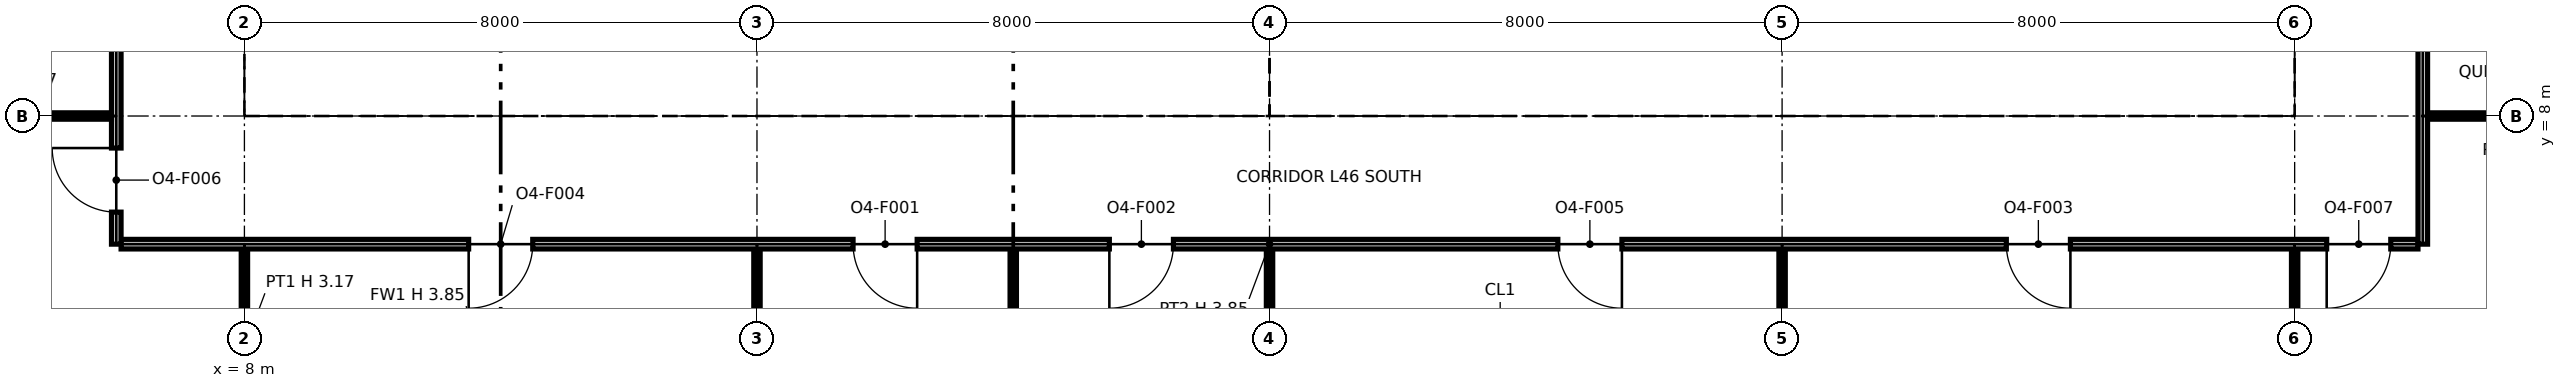
"""IFC4 building model, lengths in metres.
Left out: names, types, materials, properties, quantities, classifications, styles, units other than length and angle.
Written with IfcOpenShell. Run it as: python <this file> out.ifc"""

import sys

from ifc_helpers import new_model, si_unit, direction, frame, frame_2d, origin, origin_2d, place, context, subcontext, project, spatial, polyline, rectangle, i_section, outline, extrude, element, fill, save


model = new_model("IFC4")
c1 = context("Model", 3, precision=1e-05, world=origin(), true_north=direction((0.0, 1.0)))
c2 = subcontext(c1, "Body", "Model", "MODEL_VIEW")
j1 = project(units=[si_unit("LENGTHUNIT", "METRE"), si_unit("PLANEANGLEUNIT", "RADIAN")], contexts=[c1])
p1 = place(None, origin())
s1 = spatial("IfcSite", under=j1, at=p1, CompositionType="ELEMENT")
p2 = place(p1, origin())
s2 = spatial("IfcBuilding", under=s1, at=p2, CompositionType="ELEMENT")
p3 = place(p2, frame((0.0, 0.0, 217.0)))
s3 = spatial("IfcBuildingStorey", under=s2, at=p3, CompositionType="ELEMENT", Elevation=217.0)
for number, where, z_axis, x_axis in (
    (1, (8.0, 8.0, 0.0), (0.0, 0.0, 1.0), (1.0, 0.0, 0.0)),
    (2, (16.0, 8.0, 0.0), (0.0, 0.0, 1.0), (1.0, 0.0, 0.0)),
):
    element("IfcColumn", number, at=place(p3, frame(where, z_axis=z_axis, x_axis=x_axis)), inside=s3, PredefinedType="COLUMN", context=c2, shape_type="SweptSolid", body=[
        extrude(i_section(OverallWidth=0.373, OverallDepth=0.368, WebThickness=0.015, FlangeThickness=0.024, at=origin_2d()), origin(), (0.0, 0.0, 1.0), 3.85),
    ])
p4 = place(p3, frame((24.0, 8.0, 0.0), z_axis=(0.0, 0.0, 1.0), x_axis=(1.0, 0.0, 0.0)))
e3 = element("IfcColumn", 3, at=p4, inside=s3, PredefinedType="COLUMN", context=c2, shape_type="SweptSolid", body=[
    extrude(i_section(OverallWidth=0.394, OverallDepth=0.376, WebThickness=0.017, FlangeThickness=0.028, at=origin_2d()), origin(), (0.0, 0.0, 1.0), 3.85),
])
for number, where, z_axis, x_axis in (
    (4, (32.0, 8.0, 0.0), (0.0, 0.0, 1.0), (1.0, 0.0, 0.0)),
    (5, (40.0, 8.0, 0.0), (0.0, 0.0, 1.0), (1.0, 0.0, 0.0)),
):
    element("IfcColumn", number, at=place(p3, frame(where, z_axis=z_axis, x_axis=x_axis)), inside=s3, PredefinedType="COLUMN", context=c2, shape_type="SweptSolid", body=[
        extrude(i_section(OverallWidth=0.373, OverallDepth=0.368, WebThickness=0.015, FlangeThickness=0.024, at=origin_2d()), origin(), (0.0, 0.0, 1.0), 3.85),
    ])
p5 = place(p3, frame((8.65, 8.75, 0.0), z_axis=(0.0, 0.0, 1.0), x_axis=(1.0, 0.0, 0.0)))
e6 = element("IfcWall", 6, at=p5, inside=s3, PredefinedType="PARTITIONING", context=c2, shape_type="SweptSolid", body=[
    extrude(outline(polyline([(0.0, 0.0), (14.7, 0.0), (14.7, 3.85), (7.438, 3.85), (7.438, 3.308), (7.262, 3.308), (7.261, 3.85), (0.0, 3.85), (0.0, 0.0)])), frame((0.0, 0.1, 0.0), z_axis=(0.0, -1.0, 0.0), x_axis=(1.0, 0.0, 0.0)), (0.0, 0.0, 1.0), 0.2),
])
p6 = place(p5, frame((1.3, 0.0, 0.0)))
e7 = element("IfcOpeningElement", 7, at=p6, cuts=e6, PredefinedType="OPENING", context=c2, shape_type="SweptSolid", body=[
    extrude(rectangle(XDim=1.4, YDim=2.1, at=frame_2d((0.7, 1.05))), frame((0.0, 0.11, 0.0), z_axis=(0.0, -1.0, 0.0), x_axis=(1.0, 0.0, 0.0)), (0.0, 0.0, 1.0), 0.22),
])
p7 = place(p5, frame((4.6, 0.0, 0.0)))
e8 = element("IfcOpeningElement", 8, at=p7, cuts=e6, PredefinedType="OPENING", context=c2, shape_type="SweptSolid", body=[
    extrude(rectangle(XDim=1.4, YDim=2.1, at=frame_2d((0.7, 1.05))), frame((0.0, 0.11, 0.0), z_axis=(0.0, -1.0, 0.0), x_axis=(1.0, 0.0, 0.0)), (0.0, 0.0, 1.0), 0.22),
])
p8 = place(p5, frame((10.4, 0.0, 0.0)))
e9 = element("IfcOpeningElement", 9, at=p8, cuts=e6, PredefinedType="OPENING", context=c2, shape_type="SweptSolid", body=[
    extrude(rectangle(XDim=1.2, YDim=2.1, at=frame_2d((0.6, 1.05))), frame((0.0, 0.11, 0.0), z_axis=(0.0, -1.0, 0.0), x_axis=(1.0, 0.0, 0.0)), (0.0, 0.0, 1.0), 0.22),
])
p9 = place(p3, frame((8.75, 8.85, 0.0), z_axis=(0.0, 0.0, 1.0), x_axis=(0.0, 1.0, 0.0)))
e10 = element("IfcWall", 10, at=p9, inside=s3, PredefinedType="PARTITIONING", context=c2, shape_type="SweptSolid", body=[
    extrude(outline(polyline([(0.0, 0.0), (14.3, 0.0), (14.3, 3.85), (10.225, 3.85), (10.224, 3.44), (10.076, 3.44), (10.075, 3.85), (7.239, 3.85), (7.238, 3.308), (7.062, 3.308), (7.062, 3.85), (0.0, 3.85), (0.0, 0.0)])), frame((0.0, 0.1, 0.0), z_axis=(0.0, -1.0, 0.0), x_axis=(1.0, 0.0, 0.0)), (0.0, 0.0, 1.0), 0.2),
])
p10 = place(p9, frame((8.3, 0.0, 0.0)))
e11 = element("IfcOpeningElement", 11, at=p10, cuts=e10, PredefinedType="OPENING", context=c2, shape_type="SweptSolid", body=[
    extrude(rectangle(XDim=1.8, YDim=2.1, at=frame_2d((0.9, 1.05))), frame((0.0, 0.11, 0.0), z_axis=(0.0, -1.0, 0.0), x_axis=(1.0, 0.0, 0.0)), (0.0, 0.0, 1.0), 0.22),
])
p11 = place(p3, frame((12.4, 8.85, 0.0), z_axis=(0.0, 0.0, 1.0), x_axis=(0.0, 1.0, 0.0)))
e12 = element("IfcWall", 12, at=p11, inside=s3, PredefinedType="PARTITIONING", context=c2, shape_type="SweptSolid", body=[
    extrude(rectangle(XDim=6.85, YDim=0.2, at=frame_2d((3.425, 0.0))), origin(), (0.0, 0.0, 1.0), 3.85),
])
p12 = place(p3, frame((15.85, 8.85, 0.0), z_axis=(0.0, 0.0, 1.0), x_axis=(0.0, 1.0, 0.0)))
e13 = element("IfcWall", 13, at=p12, inside=s3, PredefinedType="PARTITIONING", context=c2, shape_type="SweptSolid", body=[
    extrude(rectangle(XDim=1.55, YDim=0.9, at=frame_2d((0.775, 0.0))), origin(), (0.0, 0.0, 1.0), 3.308),
])
p13 = place(p12, frame((0.3, 0.0, 0.0)))
e14 = element("IfcOpeningElement", 14, at=p13, cuts=e13, PredefinedType="OPENING", context=c2, shape_type="SweptSolid", body=[
    extrude(rectangle(XDim=1.1, YDim=2.1, at=frame_2d((0.55, 1.05))), frame((0.0, 0.46, 0.0), z_axis=(0.0, -1.0, 0.0), x_axis=(1.0, 0.0, 0.0)), (0.0, 0.0, 1.0), 0.92),
])
p14 = place(p3, frame((23.25, 8.85, 0.0), z_axis=(0.0, 0.0, 1.0), x_axis=(0.0, 1.0, 0.0)))
e15 = element("IfcWall", 15, at=p14, inside=s3, PredefinedType="PARTITIONING", context=c2, shape_type="SweptSolid", body=[
    extrude(outline(polyline([(0.0, 0.0), (14.3, 0.0), (14.3, 3.85), (10.225, 3.85), (10.224, 3.44), (10.076, 3.44), (10.075, 3.85), (7.239, 3.85), (7.238, 3.308), (7.062, 3.308), (7.062, 3.85), (5.225, 3.85), (5.224, 3.44), (5.076, 3.44), (5.075, 3.85), (0.0, 3.85), (0.0, 0.0)])), frame((0.0, 0.1, 0.0), z_axis=(0.0, -1.0, 0.0), x_axis=(1.0, 0.0, 0.0)), (0.0, 0.0, 1.0), 0.2),
])
p15 = place(p14, frame((8.3, 0.0, 0.0)))
e16 = element("IfcOpeningElement", 16, at=p15, cuts=e15, PredefinedType="OPENING", context=c2, shape_type="SweptSolid", body=[
    extrude(rectangle(XDim=1.8, YDim=2.1, at=frame_2d((0.9, 1.05))), frame((0.0, 0.11, 0.0), z_axis=(0.0, -1.0, 0.0), x_axis=(1.0, 0.0, 0.0)), (0.0, 0.0, 1.0), 0.22),
])
p16 = place(p3, frame((24.65, 8.75, 0.0), z_axis=(0.0, 0.0, 1.0), x_axis=(1.0, 0.0, 0.0)))
e17 = element("IfcWall", 17, at=p16, inside=s3, PredefinedType="PARTITIONING", context=c2, shape_type="SweptSolid", body=[
    extrude(outline(polyline([(0.0, 0.0), (14.7, 0.0), (14.7, 3.85), (7.438, 3.85), (7.438, 3.308), (7.262, 3.308), (7.261, 3.85), (0.0, 3.85), (0.0, 0.0)])), frame((0.0, 0.1, 0.0), z_axis=(0.0, -1.0, 0.0), x_axis=(1.0, 0.0, 0.0)), (0.0, 0.0, 1.0), 0.2),
])
p17 = place(p3, frame((24.75, 8.85, 0.0), z_axis=(0.0, 0.0, 1.0), x_axis=(0.0, 1.0, 0.0)))
e18 = element("IfcWall", 18, at=p17, inside=s3, PredefinedType="PARTITIONING", context=c2, shape_type="SweptSolid", body=[
    extrude(outline(polyline([(0.0, 0.0), (6.3, 0.0), (6.3, 3.85), (3.225, 3.85), (3.224, 3.44), (3.076, 3.44), (3.075, 3.85), (0.0, 3.85), (0.0, 0.0)])), frame((0.0, 0.1, 0.0), z_axis=(0.0, -1.0, 0.0), x_axis=(1.0, 0.0, 0.0)), (0.0, 0.0, 1.0), 0.2),
])
for number, where, z_axis, x_axis in (
    (19, (27.2, 8.85, 0.0), (0.0, 0.0, 1.0), (0.0, 1.0, 0.0)),
    (20, (29.5, 8.85, 0.0), (0.0, 0.0, 1.0), (0.0, 1.0, 0.0)),
):
    element("IfcWall", number, at=place(p3, frame(where, z_axis=z_axis, x_axis=x_axis)), inside=s3, PredefinedType="PARTITIONING", context=c2, shape_type="SweptSolid", body=[
        extrude(rectangle(XDim=2.55, YDim=0.2, at=frame_2d((1.275, 0.0))), origin(), (0.0, 0.0, 1.0), 3.85),
    ])
p18 = place(p3, frame((32.0, 8.85, 0.0), z_axis=(0.0, 0.0, 1.0), x_axis=(0.0, 1.0, 0.0)))
e21 = element("IfcWall", 21, at=p18, inside=s3, PredefinedType="PARTITIONING", context=c2, shape_type="SweptSolid", body=[
    extrude(rectangle(XDim=2.55, YDim=0.6, at=frame_2d((1.275, 0.0))), origin(), (0.0, 0.0, 1.0), 3.308),
])
for number, where, z_axis, x_axis in (
    (22, (35.6, 8.85, 0.0), (0.0, 0.0, 1.0), (0.0, 1.0, 0.0)),
    (23, (39.25, 8.85, 0.0), (0.0, 0.0, 1.0), (0.0, 1.0, 0.0)),
):
    element("IfcWall", number, at=place(p3, frame(where, z_axis=z_axis, x_axis=x_axis)), inside=s3, PredefinedType="PARTITIONING", context=c2, shape_type="SweptSolid", body=[
        extrude(rectangle(XDim=6.3, YDim=0.2, at=frame_2d((3.15, 0.0))), origin(), (0.0, 0.0, 1.0), 3.85),
    ])
p19 = place(p3, frame((20.0, 0.13, 0.0), z_axis=(0.0, 0.0, 1.0), x_axis=(0.0, 1.0, 0.0)))
e24 = element("IfcWall", 24, at=p19, inside=s3, PredefinedType="PARTITIONING", context=c2, shape_type="SweptSolid", body=[
    extrude(outline(polyline([(0.0, 0.0), (5.795, 0.0), (5.795, 3.85), (4.17, 3.85), (4.168, 3.172), (3.572, 3.172), (3.57, 3.85), (0.0, 3.85), (0.0, 0.0)])), frame((0.0, 0.05, 0.0), z_axis=(0.0, -1.0, 0.0), x_axis=(1.0, 0.0, 0.0)), (0.0, 0.0, 1.0), 0.1),
])
p20 = place(p3, frame((40.0, 0.13, 0.0), z_axis=(0.0, 0.0, 1.0), x_axis=(0.0, 1.0, 0.0)))
e25 = element("IfcWall", 25, at=p20, inside=s3, PredefinedType="PARTITIONING", context=c2, shape_type="SweptSolid", body=[
    extrude(rectangle(XDim=5.795, YDim=0.1, at=frame_2d((2.897, 0.0))), origin(), (0.0, 0.0, 1.0), 3.172),
])
for number, where, z_axis, x_axis in (
    (26, (8.0, 2.83, 0.0), (0.0, 0.0, 1.0), (0.0, 1.0, 0.0)),
    (27, (16.0, 2.83, 0.0), (0.0, 0.0, 1.0), (0.0, 1.0, 0.0)),
    (28, (24.0, 2.83, 0.0), (0.0, 0.0, 1.0), (0.0, 1.0, 0.0)),
    (29, (32.0, 2.83, 0.0), (0.0, 0.0, 1.0), (0.0, 1.0, 0.0)),
):
    element("IfcWall", number, at=place(p3, frame(where, z_axis=z_axis, x_axis=x_axis)), inside=s3, PredefinedType="PARTITIONING", context=c2, shape_type="SweptSolid", body=[
        extrude(rectangle(XDim=3.095, YDim=0.1, at=frame_2d((1.547, 0.0))), origin(), (0.0, 0.0, 1.0), 3.172),
    ])
p21 = place(p3, frame((6.075, 6.0, 0.0), z_axis=(0.0, 0.0, 1.0), x_axis=(1.0, 0.0, 0.0)))
e30 = element("IfcWall", 30, at=p21, inside=s3, PredefinedType="PARTITIONING", context=c2, shape_type="SweptSolid", body=[
    extrude(rectangle(XDim=35.85, YDim=0.15, at=frame_2d((17.925, 0.0))), origin(), (0.0, 0.0, 1.0), 3.85),
])
p22 = place(p21, frame((12.425, 0.0, 0.0), z_axis=(0.0, 0.0, 1.0), x_axis=(-1.0, 0.0, 0.0)))
e31 = element("IfcOpeningElement", 31, at=p22, cuts=e30, PredefinedType="OPENING", context=c2, shape_type="SweptSolid", body=[
    extrude(rectangle(XDim=1.0, YDim=2.1, at=frame_2d((0.5, 1.05))), frame((0.0, 0.085, 0.0), z_axis=(0.0, -1.0, 0.0), x_axis=(1.0, 0.0, 0.0)), (0.0, 0.0, 1.0), 0.17),
])
p23 = place(p21, frame((16.425, 0.0, 0.0), z_axis=(0.0, 0.0, 1.0), x_axis=(-1.0, 0.0, 0.0)))
e32 = element("IfcOpeningElement", 32, at=p23, cuts=e30, PredefinedType="OPENING", context=c2, shape_type="SweptSolid", body=[
    extrude(rectangle(XDim=1.0, YDim=2.1, at=frame_2d((0.5, 1.05))), frame((0.0, 0.085, 0.0), z_axis=(0.0, -1.0, 0.0), x_axis=(1.0, 0.0, 0.0)), (0.0, 0.0, 1.0), 0.17),
])
p24 = place(p21, frame((30.425, 0.0, 0.0), z_axis=(0.0, 0.0, 1.0), x_axis=(-1.0, 0.0, 0.0)))
e33 = element("IfcOpeningElement", 33, at=p24, cuts=e30, PredefinedType="OPENING", context=c2, shape_type="SweptSolid", body=[
    extrude(rectangle(XDim=1.0, YDim=2.1, at=frame_2d((0.5, 1.05))), frame((0.0, 0.085, 0.0), z_axis=(0.0, -1.0, 0.0), x_axis=(1.0, 0.0, 0.0)), (0.0, 0.0, 1.0), 0.17),
])
p25 = place(p21, frame((6.425, 0.0, 0.0), z_axis=(0.0, 0.0, 1.0), x_axis=(-1.0, 0.0, 0.0)))
e34 = element("IfcOpeningElement", 34, at=p25, cuts=e30, PredefinedType="OPENING", context=c2, shape_type="SweptSolid", body=[
    extrude(rectangle(XDim=1.0, YDim=2.1, at=frame_2d((0.5, 1.05))), frame((0.0, 0.085, 0.0), z_axis=(0.0, -1.0, 0.0), x_axis=(1.0, 0.0, 0.0)), (0.0, 0.0, 1.0), 0.17),
])
p26 = place(p21, frame((23.425, 0.0, 0.0), z_axis=(0.0, 0.0, 1.0), x_axis=(-1.0, 0.0, 0.0)))
e35 = element("IfcOpeningElement", 35, at=p26, cuts=e30, PredefinedType="OPENING", context=c2, shape_type="SweptSolid", body=[
    extrude(rectangle(XDim=1.0, YDim=2.1, at=frame_2d((0.5, 1.05))), frame((0.0, 0.085, 0.0), z_axis=(0.0, -1.0, 0.0), x_axis=(1.0, 0.0, 0.0)), (0.0, 0.0, 1.0), 0.17),
])
p27 = place(p21, frame((35.425, 0.0, 0.0), z_axis=(0.0, 0.0, 1.0), x_axis=(-1.0, 0.0, 0.0)))
e36 = element("IfcOpeningElement", 36, at=p27, cuts=e30, PredefinedType="OPENING", context=c2, shape_type="SweptSolid", body=[
    extrude(rectangle(XDim=1.0, YDim=2.1, at=frame_2d((0.5, 1.05))), frame((0.0, 0.085, 0.0), z_axis=(0.0, -1.0, 0.0), x_axis=(1.0, 0.0, 0.0)), (0.0, 0.0, 1.0), 0.17),
])
p28 = place(p3, frame((6.0, 6.0, 0.0), z_axis=(0.0, 0.0, 1.0), x_axis=(0.0, 1.0, 0.0)))
e37 = element("IfcWall", 37, at=p28, inside=s3, PredefinedType="PARTITIONING", context=c2, shape_type="SweptSolid", body=[
    extrude(outline(polyline([(0.0, 0.0), (13.375, 0.0), (13.375, 3.85), (10.3, 3.85), (10.298, 3.172), (9.702, 3.172), (9.7, 3.85), (6.3, 3.85), (6.298, 3.172), (5.702, 3.172), (5.7, 3.85), (2.3, 3.85), (2.298, 3.172), (1.702, 3.172), (1.7, 3.85), (0.0, 3.85), (0.0, 0.0)])), frame((0.0, 0.075, 0.0), z_axis=(0.0, -1.0, 0.0), x_axis=(1.0, 0.0, 0.0)), (0.0, 0.0, 1.0), 0.15),
])
p29 = place(p28, frame((0.5, 0.0, 0.0)))
e38 = element("IfcOpeningElement", 38, at=p29, cuts=e37, PredefinedType="OPENING", context=c2, shape_type="SweptSolid", body=[
    extrude(rectangle(XDim=1.0, YDim=2.1, at=frame_2d((0.5, 1.05))), frame((0.0, 0.085, 0.0), z_axis=(0.0, -1.0, 0.0), x_axis=(1.0, 0.0, 0.0)), (0.0, 0.0, 1.0), 0.17),
])
p30 = place(p28, frame((3.5, 0.0, 0.0)))
e39 = element("IfcOpeningElement", 39, at=p30, cuts=e37, PredefinedType="OPENING", context=c2, shape_type="SweptSolid", body=[
    extrude(rectangle(XDim=1.0, YDim=2.1, at=frame_2d((0.5, 1.05))), frame((0.0, 0.085, 0.0), z_axis=(0.0, -1.0, 0.0), x_axis=(1.0, 0.0, 0.0)), (0.0, 0.0, 1.0), 0.17),
])
p31 = place(p28, frame((7.5, 0.0, 0.0)))
e40 = element("IfcOpeningElement", 40, at=p31, cuts=e37, PredefinedType="OPENING", context=c2, shape_type="SweptSolid", body=[
    extrude(rectangle(XDim=1.0, YDim=2.1, at=frame_2d((0.5, 1.05))), frame((0.0, 0.085, 0.0), z_axis=(0.0, -1.0, 0.0), x_axis=(1.0, 0.0, 0.0)), (0.0, 0.0, 1.0), 0.17),
])
p32 = place(p28, frame((11.225, 0.0, 0.0)))
e41 = element("IfcOpeningElement", 41, at=p32, cuts=e37, PredefinedType="OPENING", context=c2, shape_type="SweptSolid", body=[
    extrude(rectangle(XDim=1.0, YDim=2.1, at=frame_2d((0.5, 1.05))), frame((0.0, 0.085, 0.0), z_axis=(0.0, -1.0, 0.0), x_axis=(1.0, 0.0, 0.0)), (0.0, 0.0, 1.0), 0.17),
])
p33 = place(p3, frame((42.0, 6.0, 0.0), z_axis=(0.0, 0.0, 1.0), x_axis=(0.0, 1.0, 0.0)))
e42 = element("IfcWall", 42, at=p33, inside=s3, PredefinedType="PARTITIONING", context=c2, shape_type="SweptSolid", body=[
    extrude(outline(polyline([(0.0, 0.0), (11.925, 0.0), (11.925, 3.85), (10.3, 3.85), (10.298, 3.172), (9.702, 3.172), (9.7, 3.85), (6.3, 3.85), (6.298, 3.172), (5.702, 3.172), (5.7, 3.85), (2.3, 3.85), (2.298, 3.172), (1.702, 3.172), (1.7, 3.85), (0.0, 3.85), (0.0, 0.0)])), frame((0.0, 0.075, 0.0), z_axis=(0.0, -1.0, 0.0), x_axis=(1.0, 0.0, 0.0)), (0.0, 0.0, 1.0), 0.15),
])
p34 = place(p33, frame((4.5, 0.0, 0.0), z_axis=(0.0, 0.0, 1.0), x_axis=(-1.0, 0.0, 0.0)))
e43 = element("IfcOpeningElement", 43, at=p34, cuts=e42, PredefinedType="OPENING", context=c2, shape_type="SweptSolid", body=[
    extrude(rectangle(XDim=1.0, YDim=2.1, at=frame_2d((0.5, 1.05))), frame((0.0, 0.085, 0.0), z_axis=(0.0, -1.0, 0.0), x_axis=(1.0, 0.0, 0.0)), (0.0, 0.0, 1.0), 0.17),
])
p35 = place(p33, frame((8.5, 0.0, 0.0), z_axis=(0.0, 0.0, 1.0), x_axis=(-1.0, 0.0, 0.0)))
e44 = element("IfcOpeningElement", 44, at=p35, cuts=e42, PredefinedType="OPENING", context=c2, shape_type="SweptSolid", body=[
    extrude(rectangle(XDim=1.0, YDim=2.1, at=frame_2d((0.5, 1.05))), frame((0.0, 0.085, 0.0), z_axis=(0.0, -1.0, 0.0), x_axis=(1.0, 0.0, 0.0)), (0.0, 0.0, 1.0), 0.17),
])
p36 = place(p33, frame((11.5, 0.0, 0.0), z_axis=(0.0, 0.0, 1.0), x_axis=(-1.0, 0.0, 0.0)))
e45 = element("IfcOpeningElement", 45, at=p36, cuts=e42, PredefinedType="OPENING", context=c2, shape_type="SweptSolid", body=[
    extrude(rectangle(XDim=1.0, YDim=2.1, at=frame_2d((0.5, 1.05))), frame((0.0, 0.085, 0.0), z_axis=(0.0, -1.0, 0.0), x_axis=(1.0, 0.0, 0.0)), (0.0, 0.0, 1.0), 0.17),
])
for number, where, z_axis, x_axis in (
    (46, (2.83, 8.0, 0.0), (0.0, 0.0, 1.0), (1.0, 0.0, 0.0)),
    (47, (42.075, 8.0, 0.0), (0.0, 0.0, 1.0), (1.0, 0.0, 0.0)),
):
    element("IfcWall", number, at=place(p3, frame(where, z_axis=z_axis, x_axis=x_axis)), inside=s3, PredefinedType="PARTITIONING", context=c2, shape_type="SweptSolid", body=[
        extrude(rectangle(XDim=3.095, YDim=0.1, at=frame_2d((1.547, 0.0))), origin(), (0.0, 0.0, 1.0), 3.172),
    ])
p37 = place(p6, origin())
e48 = element("IfcDoor", 48, at=p37, inside=s3, OperationType="DOUBLE_DOOR_SINGLE_SWING", PredefinedType="NOTDEFINED", context=c2, shape_type="SweptSolid", body=[
    extrude(rectangle(XDim=1.4, YDim=2.1, at=frame_2d((0.7, 1.05))), frame((0.0, 0.025, 0.0), z_axis=(0.0, -1.0, 0.0), x_axis=(1.0, 0.0, 0.0)), (0.0, 0.0, 1.0), 0.05),
])
fill(e7, e48)
p38 = place(p7, origin())
e49 = element("IfcDoor", 49, at=p38, inside=s3, OperationType="DOUBLE_DOOR_SINGLE_SWING", PredefinedType="NOTDEFINED", context=c2, shape_type="SweptSolid", body=[
    extrude(rectangle(XDim=1.4, YDim=2.1, at=frame_2d((0.7, 1.05))), frame((0.0, 0.025, 0.0), z_axis=(0.0, -1.0, 0.0), x_axis=(1.0, 0.0, 0.0)), (0.0, 0.0, 1.0), 0.05),
])
fill(e8, e49)
p39 = place(p8, origin())
e50 = element("IfcDoor", 50, at=p39, inside=s3, OperationType="SINGLE_SWING_RIGHT", PredefinedType="NOTDEFINED", context=c2, shape_type="SweptSolid", body=[
    extrude(rectangle(XDim=1.2, YDim=2.1, at=frame_2d((0.6, 1.05))), frame((0.0, 0.025, 0.0), z_axis=(0.0, -1.0, 0.0), x_axis=(1.0, 0.0, 0.0)), (0.0, 0.0, 1.0), 0.05),
])
fill(e9, e50)
p40 = place(p22, origin())
e51 = element("IfcDoor", 51, at=p40, inside=s3, OperationType="SINGLE_SWING_LEFT", PredefinedType="DOOR", context=c2, shape_type="SweptSolid", body=[
    extrude(rectangle(XDim=1.0, YDim=2.1, at=frame_2d((0.5, 1.05))), frame((0.0, 0.025, 0.0), z_axis=(0.0, -1.0, 0.0), x_axis=(1.0, 0.0, 0.0)), (0.0, 0.0, 1.0), 0.05),
])
fill(e31, e51)
p41 = place(p23, origin())
e52 = element("IfcDoor", 52, at=p41, inside=s3, OperationType="SINGLE_SWING_RIGHT", PredefinedType="DOOR", context=c2, shape_type="SweptSolid", body=[
    extrude(rectangle(XDim=1.0, YDim=2.1, at=frame_2d((0.5, 1.05))), frame((0.0, 0.025, 0.0), z_axis=(0.0, -1.0, 0.0), x_axis=(1.0, 0.0, 0.0)), (0.0, 0.0, 1.0), 0.05),
])
fill(e32, e52)
p42 = place(p24, origin())
e53 = element("IfcDoor", 53, at=p42, inside=s3, OperationType="SINGLE_SWING_LEFT", PredefinedType="DOOR", context=c2, shape_type="SweptSolid", body=[
    extrude(rectangle(XDim=1.0, YDim=2.1, at=frame_2d((0.5, 1.05))), frame((0.0, 0.025, 0.0), z_axis=(0.0, -1.0, 0.0), x_axis=(1.0, 0.0, 0.0)), (0.0, 0.0, 1.0), 0.05),
])
fill(e33, e53)
p43 = place(p25, origin())
e54 = element("IfcDoor", 54, at=p43, inside=s3, OperationType="SINGLE_SWING_RIGHT", PredefinedType="DOOR", context=c2, shape_type="SweptSolid", body=[
    extrude(rectangle(XDim=1.0, YDim=2.1, at=frame_2d((0.5, 1.05))), frame((0.0, 0.025, 0.0), z_axis=(0.0, -1.0, 0.0), x_axis=(1.0, 0.0, 0.0)), (0.0, 0.0, 1.0), 0.05),
])
fill(e34, e54)
p44 = place(p26, origin())
e55 = element("IfcDoor", 55, at=p44, inside=s3, OperationType="SINGLE_SWING_LEFT", PredefinedType="DOOR", context=c2, shape_type="SweptSolid", body=[
    extrude(rectangle(XDim=1.0, YDim=2.1, at=frame_2d((0.5, 1.05))), frame((0.0, 0.025, 0.0), z_axis=(0.0, -1.0, 0.0), x_axis=(1.0, 0.0, 0.0)), (0.0, 0.0, 1.0), 0.05),
])
fill(e35, e55)
p45 = place(p29, origin())
e56 = element("IfcDoor", 56, at=p45, inside=s3, OperationType="SINGLE_SWING_RIGHT", PredefinedType="DOOR", context=c2, shape_type="SweptSolid", body=[
    extrude(rectangle(XDim=1.0, YDim=2.1, at=frame_2d((0.5, 1.05))), frame((0.0, 0.025, 0.0), z_axis=(0.0, -1.0, 0.0), x_axis=(1.0, 0.0, 0.0)), (0.0, 0.0, 1.0), 0.05),
])
fill(e38, e56)
p46 = place(p27, origin())
e57 = element("IfcDoor", 57, at=p46, inside=s3, OperationType="SINGLE_SWING_RIGHT", PredefinedType="DOOR", context=c2, shape_type="SweptSolid", body=[
    extrude(rectangle(XDim=1.0, YDim=2.1, at=frame_2d((0.5, 1.05))), frame((0.0, 0.025, 0.0), z_axis=(0.0, -1.0, 0.0), x_axis=(1.0, 0.0, 0.0)), (0.0, 0.0, 1.0), 0.05),
])
fill(e36, e57)
save(model, sys.argv[1])
